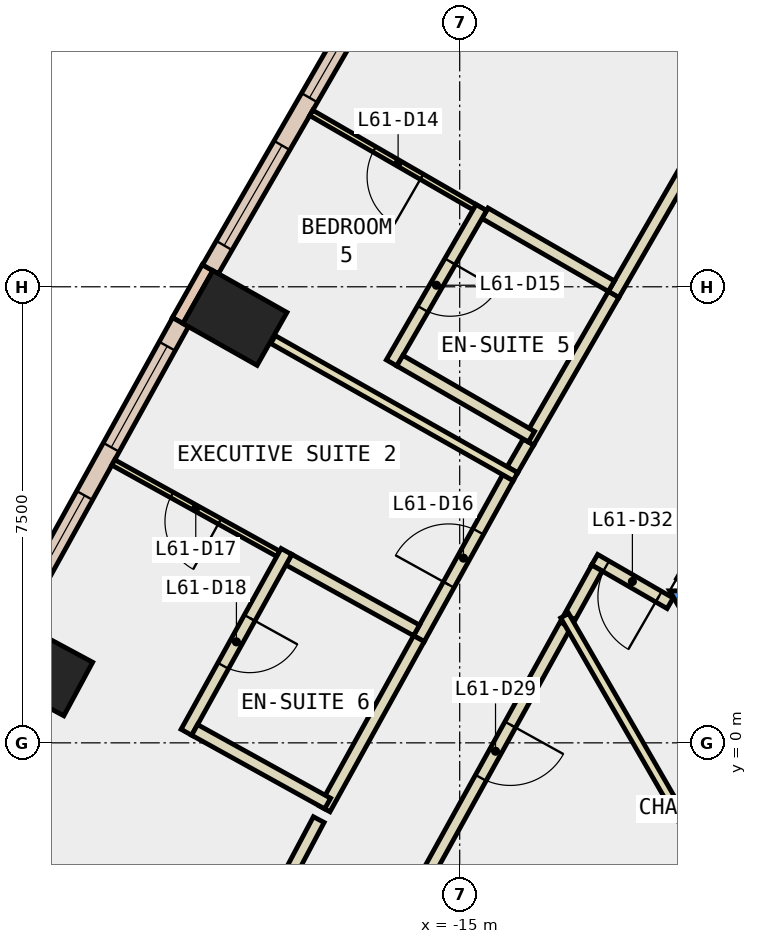
"""IFC4 building model, lengths in metres.
Left out: names, types, materials, properties, quantities, classifications, styles, units other than length and angle.
Written with IfcOpenShell. Run it as: python <this file> out.ifc"""

import sys

from ifc_helpers import new_model, si_unit, direction, frame, frame_2d, origin, origin_2d, place, context, subcontext, project, spatial, polyline, rectangle, outline, extrude, element, fill, save


model = new_model("IFC4")
c1 = context("Model", 3, precision=1e-05, world=origin(), true_north=direction((0.0, 1.0)))
c2 = subcontext(c1, "Body", "Model", "MODEL_VIEW")
j1 = project(units=[si_unit("LENGTHUNIT", "METRE"), si_unit("PLANEANGLEUNIT", "RADIAN")], contexts=[c1])
p1 = place(None, origin())
s1 = spatial("IfcSite", under=j1, at=p1, CompositionType="ELEMENT")
p2 = place(p1, origin())
s2 = spatial("IfcBuilding", under=s1, at=p2, CompositionType="ELEMENT")
p3 = place(p2, frame((0.0, 0.0, 266.6)))
s3 = spatial("IfcBuildingStorey", under=s2, at=p3, CompositionType="ELEMENT", Elevation=266.6)
for number, where, z_axis, x_axis in (
    (1, (-18.696, 6.987, -0.34), (0.0, 0.0, 1.0), (0.491, 0.871, 0.0)),
    (2, (-21.89, 1.217, -0.34), (0.0, 0.0, 1.0), (0.474, 0.881, 0.0)),
):
    element("IfcColumn", number, at=place(p3, frame(where, z_axis=z_axis, x_axis=x_axis)), inside=s3, PredefinedType="COLUMN", context=c2, shape_type="SweptSolid", body=[
        extrude(rectangle(XDim=1.0, YDim=1.4, at=origin_2d()), origin(), (0.0, 0.0, 1.0), 3.6),
    ])
p4 = place(p3, frame((0.0, 0.0, -0.34)))
e3 = element("IfcWall", 3, at=p4, inside=s3, PredefinedType="SHEAR", context=c2, shape_type="SweptSolid", body=[
    extrude(outline(polyline([(-11.547, 2.5), (-5.774, -7.5), (-5.427, -6.9), (-10.854, 2.5), (-11.547, 2.5)])), origin(), (0.0, 0.0, 1.0), 3.6),
])
p5 = place(p3, frame((-19.147, 7.815, 0.0), z_axis=(0.0, 0.0, 1.0), x_axis=(-0.491848119507, -0.870681013539, 0.0)))
e4 = element("IfcWall", 4, at=p5, inside=s3, PredefinedType="STANDARD", context=c2, shape_type="SweptSolid", body=[
    extrude(rectangle(XDim=1.0, YDim=0.2, at=frame_2d((0.5, 0.0))), origin(), (0.0, 0.0, 1.0), 3.26),
])
p6 = place(p3, frame((-16.294, 12.647, 0.0), z_axis=(0.0, 0.0, 1.0), x_axis=(-0.500041292042, -0.866001562501, 0.0)))
e5 = element("IfcWall", 5, at=p6, inside=s3, PredefinedType="STANDARD", context=c2, shape_type="SweptSolid", body=[
    extrude(rectangle(XDim=5.612, YDim=0.3, at=frame_2d((2.806, 0.0))), origin(), (0.0, 0.0, 1.0), 3.26),
])
p7 = place(p6, frame((0.453, 0.0, 0.9)))
e6 = element("IfcOpeningElement", 6, at=p7, cuts=e5, PredefinedType="OPENING", context=c2, shape_type="SweptSolid", body=[
    extrude(rectangle(XDim=1.9, YDim=2.0, at=frame_2d((0.95, 1.0))), frame((0.0, 0.16, 0.0), z_axis=(0.0, -1.0, 0.0), x_axis=(1.0, 0.0, 0.0)), (0.0, 0.0, 1.0), 0.32),
])
p8 = place(p6, frame((3.259, 0.0, 0.9)))
e7 = element("IfcOpeningElement", 7, at=p8, cuts=e5, PredefinedType="OPENING", context=c2, shape_type="SweptSolid", body=[
    extrude(rectangle(XDim=1.9, YDim=2.0, at=frame_2d((0.95, 1.0))), frame((0.0, 0.16, 0.0), z_axis=(0.0, -1.0, 0.0), x_axis=(1.0, 0.0, 0.0)), (0.0, 0.0, 1.0), 0.32),
])
p9 = place(p3, frame((-19.591, 6.919, 0.0), z_axis=(0.0, 0.0, 1.0), x_axis=(-0.484260568952, -0.874923826032, 0.0)))
e8 = element("IfcWall", 8, at=p9, inside=s3, PredefinedType="STANDARD", context=c2, shape_type="SweptSolid", body=[
    extrude(rectangle(XDim=5.611, YDim=0.3, at=frame_2d((2.805, 0.0))), origin(), (0.0, 0.0, 1.0), 3.26),
])
p10 = place(p9, frame((0.453, 0.0, 0.9)))
e9 = element("IfcOpeningElement", 9, at=p10, cuts=e8, PredefinedType="OPENING", context=c2, shape_type="SweptSolid", body=[
    extrude(rectangle(XDim=1.9, YDim=2.0, at=frame_2d((0.95, 1.0))), frame((0.0, 0.16, 0.0), z_axis=(0.0, -1.0, 0.0), x_axis=(1.0, 0.0, 0.0)), (0.0, 0.0, 1.0), 0.32),
])
p11 = place(p9, frame((3.258, 0.0, 0.9)))
e10 = element("IfcOpeningElement", 10, at=p11, cuts=e8, PredefinedType="OPENING", context=c2, shape_type="SweptSolid", body=[
    extrude(rectangle(XDim=1.9, YDim=2.0, at=frame_2d((0.95, 1.0))), frame((0.0, 0.16, 0.0), z_axis=(0.0, -1.0, 0.0), x_axis=(1.0, 0.0, 0.0)), (0.0, 0.0, 1.0), 0.32),
])
p12 = place(p3, frame((-11.539, 2.295, 0.0), z_axis=(0.0, 0.0, 1.0), x_axis=(-0.866023989838, 0.500002449018, 0.0)))
e11 = element("IfcWall", 11, at=p12, inside=s3, PredefinedType="PARTITIONING", context=c2, shape_type="SweptSolid", body=[
    extrude(rectangle(XDim=1.434, YDim=0.2, at=frame_2d((0.717, 0.0))), origin(), (0.0, 0.0, 1.0), 3.26),
])
p13 = place(p12, frame((0.217, 0.0, 0.0)))
e12 = element("IfcOpeningElement", 12, at=p13, cuts=e11, PredefinedType="OPENING", context=c2, shape_type="SweptSolid", body=[
    extrude(rectangle(XDim=1.0, YDim=2.1, at=frame_2d((0.5, 1.05))), frame((0.0, 0.11, 0.0), z_axis=(0.0, -1.0, 0.0), x_axis=(1.0, 0.0, 0.0)), (0.0, 0.0, 1.0), 0.22),
])
p14 = place(p3, frame((-12.743, 2.875, 0.0), z_axis=(0.0, 0.0, 1.0), x_axis=(-0.484334040176, -0.8748831565, 0.0)))
e13 = element("IfcWall", 13, at=p14, inside=s3, PredefinedType="PARTITIONING", context=c2, shape_type="SweptSolid", body=[
    extrude(rectangle(XDim=0.919, YDim=0.2, at=frame_2d((0.459, 0.0))), origin(), (0.0, 0.0, 1.0), 3.26),
])
p15 = place(p3, frame((-13.261, 1.939, 0.0), z_axis=(0.0, 0.0, 1.0), x_axis=(-0.484323615817, -0.874888927329, 0.0)))
e14 = element("IfcWall", 14, at=p15, inside=s3, PredefinedType="PARTITIONING", context=c2, shape_type="SweptSolid", body=[
    extrude(rectangle(XDim=4.747, YDim=0.2, at=frame_2d((2.374, 0.0))), origin(), (0.0, 0.0, 1.0), 3.26),
])
p16 = place(p15, frame((1.874, 0.0, 0.0)))
e15 = element("IfcOpeningElement", 15, at=p16, cuts=e14, PredefinedType="OPENING", context=c2, shape_type="SweptSolid", body=[
    extrude(rectangle(XDim=1.0, YDim=2.1, at=frame_2d((0.5, 1.05))), frame((0.0, 0.11, 0.0), z_axis=(0.0, -1.0, 0.0), x_axis=(1.0, 0.0, 0.0)), (0.0, 0.0, 1.0), 0.22),
])
p17 = place(p3, frame((-12.469, 7.373, 0.0), z_axis=(0.0, 0.0, 1.0), x_axis=(0.500129289791, 0.86595074542, 0.0)))
e16 = element("IfcWall", 16, at=p17, inside=s3, PredefinedType="PARTITIONING", context=c2, shape_type="SweptSolid", body=[
    extrude(rectangle(XDim=3.099, YDim=0.2, at=frame_2d((1.55, 0.0))), origin(), (0.0, 0.0, 1.0), 3.26),
])
p18 = place(p3, frame((-14.132, 4.492, 0.0), z_axis=(0.0, 0.0, 1.0), x_axis=(0.499829488579, 0.86612382622, 0.0)))
e17 = element("IfcWall", 17, at=p18, inside=s3, PredefinedType="PARTITIONING", context=c2, shape_type="SweptSolid", body=[
    extrude(rectangle(XDim=0.527, YDim=0.2, at=frame_2d((0.263, 0.0))), origin(), (0.0, 0.0, 1.0), 3.26),
])
p19 = place(p3, frame((-13.869, 4.948, 0.0), z_axis=(0.0, 0.0, 1.0), x_axis=(0.49994636267, 0.866056369097, 0.0)))
e18 = element("IfcWall", 18, at=p19, inside=s3, PredefinedType="PARTITIONING", context=c2, shape_type="SweptSolid", body=[
    extrude(rectangle(XDim=2.8, YDim=0.2, at=frame_2d((1.4, 0.0))), origin(), (0.0, 0.0, 1.0), 3.26),
])
p20 = place(p3, frame((-15.671, 1.714, 0.0), z_axis=(0.0, 0.0, 1.0), x_axis=(0.484203367026, 0.874955484216, 0.0)))
e19 = element("IfcWall", 19, at=p20, inside=s3, PredefinedType="PARTITIONING", context=c2, shape_type="SweptSolid", body=[
    extrude(rectangle(XDim=3.025, YDim=0.2, at=frame_2d((1.513, 0.0))), origin(), (0.0, 0.0, 1.0), 3.26),
])
p21 = place(p20, frame((1.013, 0.0, 0.0)))
e20 = element("IfcOpeningElement", 20, at=p21, cuts=e19, PredefinedType="OPENING", context=c2, shape_type="SweptSolid", body=[
    extrude(rectangle(XDim=1.0, YDim=2.1, at=frame_2d((0.5, 1.05))), frame((0.0, 0.11, 0.0), z_axis=(0.0, -1.0, 0.0), x_axis=(1.0, 0.0, 0.0)), (0.0, 0.0, 1.0), 0.22),
])
p22 = place(p3, frame((-20.229, -6.754, 0.0), z_axis=(0.0, 0.0, 1.0), x_axis=(0.468313568794, 0.883562335822, 0.0)))
e21 = element("IfcWall", 21, at=p22, inside=s3, PredefinedType="PARTITIONING", context=c2, shape_type="SweptSolid", body=[
    extrude(rectangle(XDim=6.216, YDim=0.2, at=frame_2d((3.108, 0.0))), origin(), (0.0, 0.0, 1.0), 3.26),
])
p23 = place(p3, frame((-17.221, -1.085, 0.0), z_axis=(0.0, 0.0, 1.0), x_axis=(0.48445041864, 0.874818719438, 0.0)))
e22 = element("IfcWall", 22, at=p23, inside=s3, PredefinedType="PARTITIONING", context=c2, shape_type="SweptSolid", body=[
    extrude(rectangle(XDim=3.2, YDim=0.2, at=frame_2d((1.6, 0.0))), origin(), (0.0, 0.0, 1.0), 3.26),
])
p24 = place(p3, frame((-13.274, 2.092, 0.0), z_axis=(0.0, 0.0, 1.0), x_axis=(0.500002592159, -0.866023907196, 0.0)))
e23 = element("IfcWall", 23, at=p24, inside=s3, PredefinedType="PARTITIONING", context=c2, shape_type="SweptSolid", body=[
    extrude(rectangle(XDim=6.538, YDim=0.15, at=frame_2d((3.269, 0.0))), origin(), (0.0, 0.0, 1.0), 3.26),
])
p25 = place(p3, frame((-14.584, 8.71, 0.0), z_axis=(0.0, 0.0, 1.0), x_axis=(-0.866008176907, 0.50002983664, 0.0)))
e24 = element("IfcWall", 24, at=p25, inside=s3, PredefinedType="PARTITIONING", context=c2, shape_type="SweptSolid", body=[
    extrude(rectangle(XDim=3.3, YDim=0.1, at=frame_2d((1.65, 0.0))), origin(), (0.0, 0.0, 1.0), 3.26),
])
p26 = place(p25, frame((1.2, 0.0, 0.0)))
e25 = element("IfcOpeningElement", 25, at=p26, cuts=e24, PredefinedType="OPENING", context=c2, shape_type="SweptSolid", body=[
    extrude(rectangle(XDim=0.9, YDim=2.1, at=frame_2d((0.45, 1.05))), frame((0.0, 0.06, 0.0), z_axis=(0.0, -1.0, 0.0), x_axis=(1.0, 0.0, 0.0)), (0.0, 0.0, 1.0), 0.12),
])
p27 = place(p3, frame((-12.505, 7.51, 0.0), z_axis=(0.0, 0.0, 1.0), x_axis=(-0.866277021052, 0.499563932643, 0.0)))
e26 = element("IfcWall", 26, at=p27, inside=s3, PredefinedType="PARTITIONING", context=c2, shape_type="SweptSolid", body=[
    extrude(rectangle(XDim=2.4, YDim=0.2, at=frame_2d((1.2, 0.0))), origin(), (0.0, 0.0, 1.0), 3.26),
])
p28 = place(p3, frame((-14.645, 8.803, 0.0), z_axis=(0.0, 0.0, 1.0), x_axis=(-0.500001826776, -0.866024349092, 0.0)))
e27 = element("IfcWall", 27, at=p28, inside=s3, PredefinedType="PARTITIONING", context=c2, shape_type="SweptSolid", body=[
    extrude(rectangle(XDim=2.95, YDim=0.2, at=frame_2d((1.475, 0.0))), origin(), (0.0, 0.0, 1.0), 3.26),
])
p29 = place(p28, frame((1.025, 0.0, 0.0)))
e28 = element("IfcOpeningElement", 28, at=p29, cuts=e27, PredefinedType="OPENING", context=c2, shape_type="SweptSolid", body=[
    extrude(rectangle(XDim=0.9, YDim=2.1, at=frame_2d((0.45, 1.05))), frame((0.0, 0.11, 0.0), z_axis=(0.0, -1.0, 0.0), x_axis=(1.0, 0.0, 0.0)), (0.0, 0.0, 1.0), 0.22),
])
p30 = place(p3, frame((-15.984, 6.285, 0.0), z_axis=(0.0, 0.0, 1.0), x_axis=(0.865998541277, -0.500046524342, 0.0)))
e29 = element("IfcWall", 29, at=p30, inside=s3, PredefinedType="PARTITIONING", context=c2, shape_type="SweptSolid", body=[
    extrude(rectangle(XDim=2.5, YDim=0.2, at=frame_2d((1.25, 0.0))), origin(), (0.0, 0.0, 1.0), 3.26),
])
p31 = place(p3, frame((-14.083, 4.377, 0.0), z_axis=(0.0, 0.0, 1.0), x_axis=(-0.870415885751, 0.492317159799, 0.0)))
e30 = element("IfcWall", 30, at=p31, inside=s3, PredefinedType="PARTITIONING", context=c2, shape_type="SweptSolid", body=[
    extrude(rectangle(XDim=4.581, YDim=0.15, at=frame_2d((2.29, 0.0))), origin(), (0.0, 0.0, 1.0), 3.26),
])
p32 = place(p3, frame((-17.985, 3.109, 0.0), z_axis=(0.0, 0.0, 1.0), x_axis=(-0.874762085098, 0.484552674614, 0.0)))
e31 = element("IfcWall", 31, at=p32, inside=s3, PredefinedType="PARTITIONING", context=c2, shape_type="SweptSolid", body=[
    extrude(rectangle(XDim=3.1, YDim=0.1, at=frame_2d((1.55, 0.0))), origin(), (0.0, 0.0, 1.0), 3.26),
])
p33 = place(p32, frame((1.1, 0.0, 0.0)))
e32 = element("IfcOpeningElement", 32, at=p33, cuts=e31, PredefinedType="OPENING", context=c2, shape_type="SweptSolid", body=[
    extrude(rectangle(XDim=0.9, YDim=2.1, at=frame_2d((0.45, 1.05))), frame((0.0, 0.06, 0.0), z_axis=(0.0, -1.0, 0.0), x_axis=(1.0, 0.0, 0.0)), (0.0, 0.0, 1.0), 0.12),
])
p34 = place(p3, frame((-15.71, 1.85, 0.0), z_axis=(0.0, 0.0, 1.0), x_axis=(-0.874842414173, 0.484407628308, 0.0)))
e33 = element("IfcWall", 33, at=p34, inside=s3, PredefinedType="PARTITIONING", context=c2, shape_type="SweptSolid", body=[
    extrude(rectangle(XDim=2.401, YDim=0.2, at=frame_2d((1.2, 0.0))), origin(), (0.0, 0.0, 1.0), 3.26),
])
p35 = place(p3, frame((-17.849, 3.148, 0.0), z_axis=(0.0, 0.0, 1.0), x_axis=(-0.484257957482, -0.874925271446, 0.0)))
e34 = element("IfcWall", 34, at=p35, inside=s3, PredefinedType="PARTITIONING", context=c2, shape_type="SweptSolid", body=[
    extrude(rectangle(XDim=3.399, YDim=0.2, at=frame_2d((1.699, 0.0))), origin(), (0.0, 0.0, 1.0), 3.26),
])
p36 = place(p35, frame((1.25, 0.0, 0.0)))
e35 = element("IfcOpeningElement", 35, at=p36, cuts=e34, PredefinedType="OPENING", context=c2, shape_type="SweptSolid", body=[
    extrude(rectangle(XDim=0.9, YDim=2.1, at=frame_2d((0.45, 1.05))), frame((0.0, 0.11, 0.0), z_axis=(0.0, -1.0, 0.0), x_axis=(1.0, 0.0, 0.0)), (0.0, 0.0, 1.0), 0.22),
])
p37 = place(p3, frame((-19.36, 0.213, 0.0), z_axis=(0.0, 0.0, 1.0), x_axis=(0.874939003568, -0.484233146362, 0.0)))
e36 = element("IfcWall", 36, at=p37, inside=s3, PredefinedType="PARTITIONING", context=c2, shape_type="SweptSolid", body=[
    extrude(rectangle(XDim=2.501, YDim=0.2, at=frame_2d((1.25, 0.0))), origin(), (0.0, 0.0, 1.0), 3.26),
])
p38 = place(p3, frame((-10.449, 4.203, 0.0), z_axis=(0.0, 0.0, 1.0), x_axis=(-0.499914839587, -0.866074565589, 0.0)))
e37 = element("IfcWall", 37, at=p38, inside=s3, PredefinedType="PARTITIONING", context=c2, shape_type="SweptSolid", body=[
    extrude(rectangle(XDim=1.794, YDim=0.2, at=frame_2d((0.897, 0.0))), origin(), (0.0, 0.0, 1.0), 2.4),
])
p39 = place(p38, frame((0.397, 0.0, 0.0)))
e38 = element("IfcOpeningElement", 38, at=p39, cuts=e37, PredefinedType="OPENING", context=c2, shape_type="SweptSolid", body=[
    extrude(rectangle(XDim=1.0, YDim=2.1, at=frame_2d((0.5, 1.05))), frame((0.0, 0.11, 0.0), z_axis=(0.0, -1.0, 0.0), x_axis=(1.0, 0.0, 0.0)), (0.0, 0.0, 1.0), 0.22),
])
p40 = place(p7, origin())
e39 = element("IfcWindow", 39, at=p40, inside=s3, PartitioningType="SINGLE_PANEL", PredefinedType="WINDOW", context=c2, shape_type="SweptSolid", body=[
    extrude(rectangle(XDim=1.9, YDim=2.0, at=frame_2d((0.95, 1.0))), frame((0.0, 0.03, 0.0), z_axis=(0.0, -1.0, 0.0), x_axis=(1.0, 0.0, 0.0)), (0.0, 0.0, 1.0), 0.06),
])
fill(e6, e39)
p41 = place(p8, origin())
e40 = element("IfcWindow", 40, at=p41, inside=s3, PartitioningType="SINGLE_PANEL", PredefinedType="WINDOW", context=c2, shape_type="SweptSolid", body=[
    extrude(rectangle(XDim=1.9, YDim=2.0, at=frame_2d((0.95, 1.0))), frame((0.0, 0.03, 0.0), z_axis=(0.0, -1.0, 0.0), x_axis=(1.0, 0.0, 0.0)), (0.0, 0.0, 1.0), 0.06),
])
fill(e7, e40)
p42 = place(p10, origin())
e41 = element("IfcWindow", 41, at=p42, inside=s3, PartitioningType="SINGLE_PANEL", PredefinedType="WINDOW", context=c2, shape_type="SweptSolid", body=[
    extrude(rectangle(XDim=1.9, YDim=2.0, at=frame_2d((0.95, 1.0))), frame((0.0, 0.03, 0.0), z_axis=(0.0, -1.0, 0.0), x_axis=(1.0, 0.0, 0.0)), (0.0, 0.0, 1.0), 0.06),
])
fill(e9, e41)
p43 = place(p11, origin())
e42 = element("IfcWindow", 42, at=p43, inside=s3, PartitioningType="SINGLE_PANEL", PredefinedType="WINDOW", context=c2, shape_type="SweptSolid", body=[
    extrude(rectangle(XDim=1.9, YDim=2.0, at=frame_2d((0.95, 1.0))), frame((0.0, 0.03, 0.0), z_axis=(0.0, -1.0, 0.0), x_axis=(1.0, 0.0, 0.0)), (0.0, 0.0, 1.0), 0.06),
])
fill(e10, e42)
p44 = place(p26, origin())
e43 = element("IfcDoor", 43, at=p44, inside=s3, OperationType="SINGLE_SWING_LEFT", PredefinedType="DOOR", context=c2, shape_type="SweptSolid", body=[
    extrude(rectangle(XDim=0.9, YDim=2.1, at=frame_2d((0.45, 1.05))), frame((0.0, 0.025, 0.0), z_axis=(0.0, -1.0, 0.0), x_axis=(1.0, 0.0, 0.0)), (0.0, 0.0, 1.0), 0.05),
])
fill(e25, e43)
p45 = place(p29, origin())
e44 = element("IfcDoor", 44, at=p45, inside=s3, OperationType="SINGLE_SWING_LEFT", PredefinedType="DOOR", context=c2, shape_type="SweptSolid", body=[
    extrude(rectangle(XDim=0.9, YDim=2.1, at=frame_2d((0.45, 1.05))), frame((0.0, 0.025, 0.0), z_axis=(0.0, -1.0, 0.0), x_axis=(1.0, 0.0, 0.0)), (0.0, 0.0, 1.0), 0.05),
])
fill(e28, e44)
p46 = place(p21, origin())
e45 = element("IfcDoor", 45, at=p46, inside=s3, OperationType="SINGLE_SWING_RIGHT", PredefinedType="DOOR", context=c2, shape_type="SweptSolid", body=[
    extrude(rectangle(XDim=1.0, YDim=2.1, at=frame_2d((0.5, 1.05))), frame((0.0, 0.025, 0.0), z_axis=(0.0, -1.0, 0.0), x_axis=(1.0, 0.0, 0.0)), (0.0, 0.0, 1.0), 0.05),
])
fill(e20, e45)
p47 = place(p33, origin())
e46 = element("IfcDoor", 46, at=p47, inside=s3, OperationType="SINGLE_SWING_LEFT", PredefinedType="DOOR", context=c2, shape_type="SweptSolid", body=[
    extrude(rectangle(XDim=0.9, YDim=2.1, at=frame_2d((0.45, 1.05))), frame((0.0, 0.025, 0.0), z_axis=(0.0, -1.0, 0.0), x_axis=(1.0, 0.0, 0.0)), (0.0, 0.0, 1.0), 0.05),
])
fill(e32, e46)
p48 = place(p36, origin())
e47 = element("IfcDoor", 47, at=p48, inside=s3, OperationType="SINGLE_SWING_LEFT", PredefinedType="DOOR", context=c2, shape_type="SweptSolid", body=[
    extrude(rectangle(XDim=0.9, YDim=2.1, at=frame_2d((0.45, 1.05))), frame((0.0, 0.025, 0.0), z_axis=(0.0, -1.0, 0.0), x_axis=(1.0, 0.0, 0.0)), (0.0, 0.0, 1.0), 0.05),
])
fill(e35, e47)
p49 = place(p16, origin())
e48 = element("IfcDoor", 48, at=p49, inside=s3, OperationType="SINGLE_SWING_LEFT", PredefinedType="DOOR", context=c2, shape_type="SweptSolid", body=[
    extrude(rectangle(XDim=1.0, YDim=2.1, at=frame_2d((0.5, 1.05))), frame((0.0, 0.025, 0.0), z_axis=(0.0, -1.0, 0.0), x_axis=(1.0, 0.0, 0.0)), (0.0, 0.0, 1.0), 0.05),
])
fill(e15, e48)
p50 = place(p13, origin())
e49 = element("IfcDoor", 49, at=p50, inside=s3, OperationType="SINGLE_SWING_RIGHT", PredefinedType="DOOR", context=c2, shape_type="SweptSolid", body=[
    extrude(rectangle(XDim=1.0, YDim=2.1, at=frame_2d((0.5, 1.05))), frame((0.0, 0.025, 0.0), z_axis=(0.0, -1.0, 0.0), x_axis=(1.0, 0.0, 0.0)), (0.0, 0.0, 1.0), 0.05),
])
fill(e12, e49)
save(model, sys.argv[1])
